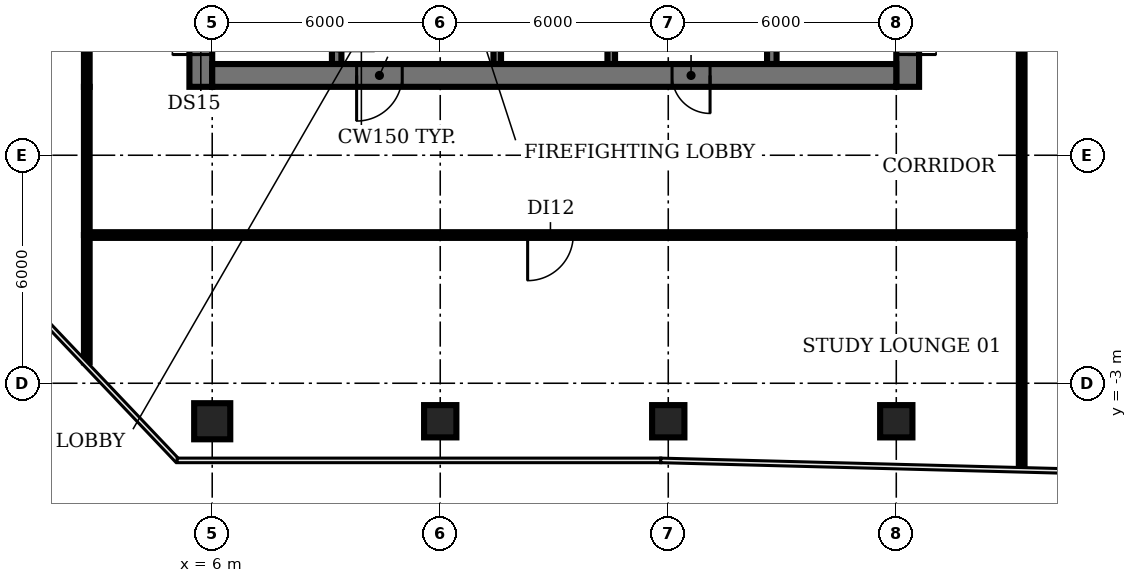
"""IFC4 building model, lengths in metres.
Left out: names, types, materials, properties, quantities, classifications, styles, units other than length and angle.
Written with IfcOpenShell. Run it as: python <this file> out.ifc"""

import sys

from ifc_helpers import new_model, si_unit, direction, frame, frame_2d, origin, origin_2d, place, context, subcontext, project, spatial, rectangle, circle, extrude, element, fill, save


model = new_model("IFC4")
c1 = context("Model", 3, precision=1e-05, world=origin(), true_north=direction((0.0, 1.0)))
c2 = subcontext(c1, "Body", "Model", "MODEL_VIEW")
j1 = project(units=[si_unit("LENGTHUNIT", "METRE"), si_unit("PLANEANGLEUNIT", "RADIAN")], contexts=[c1])
p1 = place(None, origin())
s1 = spatial("IfcSite", under=j1, at=p1, CompositionType="ELEMENT")
p2 = place(p1, origin())
s2 = spatial("IfcBuilding", under=s1, at=p2, CompositionType="ELEMENT")
p3 = place(p2, frame((0.0, 0.0, 163.4)))
s3 = spatial("IfcBuildingStorey", under=s2, at=p3, CompositionType="ELEMENT", Elevation=163.4)
p4 = place(p3, frame((6.0, -4.0, 0.0), z_axis=(0.0, 0.0, 1.0), x_axis=(1.0, 0.0, 0.0)))
e1 = element("IfcColumn", 1, at=p4, inside=s3, PredefinedType="COLUMN", context=c2, shape_type="SweptSolid", body=[
    extrude(circle(Radius=0.475, at=origin_2d()), origin(), (0.0, 0.0, 1.0), 3.85),
])
for number, where, z_axis, x_axis in (
    (2, (12.0, -4.0, 0.0), (0.0, 0.0, 1.0), (1.0, 0.0, 0.0)),
    (3, (18.0, -4.0, 0.0), (0.0, 0.0, 1.0), (1.0, 0.0, 0.0)),
    (4, (24.0, -4.0, 0.0), (0.0, 0.0, 1.0), (1.0, 0.0, 0.0)),
):
    element("IfcColumn", number, at=place(p3, frame(where, z_axis=z_axis, x_axis=x_axis)), inside=s3, PredefinedType="COLUMN", context=c2, shape_type="SweptSolid", body=[
        extrude(rectangle(XDim=0.85, YDim=0.85, at=origin_2d()), origin(), (0.0, 0.0, 1.0), 3.85),
    ])
p5 = place(p3, frame((9.275, 11.825, 0.0), z_axis=(0.0, 0.0, 1.0), x_axis=(0.0, -1.0, 0.0)))
e5 = element("IfcWall", 5, at=p5, inside=s3, PredefinedType="SHEAR", context=c2, shape_type="SweptSolid", body=[
    extrude(rectangle(XDim=6.425, YDim=0.25, at=frame_2d((3.212, 0.0))), origin(), (0.0, 0.0, 1.0), 3.85),
])
p6 = place(p5, frame((5.075, 0.0, 0.0)))
e6 = element("IfcOpeningElement", 6, at=p6, cuts=e5, PredefinedType="OPENING", context=c2, shape_type="SweptSolid", body=[
    extrude(rectangle(XDim=1.0, YDim=2.1, at=frame_2d((0.5, 1.05))), frame((0.0, 0.135, 0.0), z_axis=(0.0, -1.0, 0.0), x_axis=(1.0, 0.0, 0.0)), (0.0, 0.0, 1.0), 0.27),
])
p7 = place(p3, frame((13.5, 5.4, 0.0), z_axis=(0.0, 0.0, 1.0), x_axis=(0.0, 1.0, 0.0)))
e7 = element("IfcWall", 7, at=p7, inside=s3, PredefinedType="SHEAR", context=c2, shape_type="SweptSolid", body=[
    extrude(rectangle(XDim=8.2, YDim=0.2, at=frame_2d((4.1, 0.0))), origin(), (0.0, 0.0, 1.0), 3.85),
])
p8 = place(p7, frame((0.75, 0.0, 0.0)))
e8 = element("IfcOpeningElement", 8, at=p8, cuts=e7, PredefinedType="OPENING", context=c2, shape_type="SweptSolid", body=[
    extrude(rectangle(XDim=1.1, YDim=2.1, at=frame_2d((0.55, 1.05))), frame((0.0, 0.11, 0.0), z_axis=(0.0, -1.0, 0.0), x_axis=(1.0, 0.0, 0.0)), (0.0, 0.0, 1.0), 0.22),
])
p9 = place(p7, frame((3.55, 0.0, 0.0)))
e9 = element("IfcOpeningElement", 9, at=p9, cuts=e7, PredefinedType="OPENING", context=c2, shape_type="SweptSolid", body=[
    extrude(rectangle(XDim=1.1, YDim=2.1, at=frame_2d((0.55, 1.05))), frame((0.0, 0.11, 0.0), z_axis=(0.0, -1.0, 0.0), x_axis=(1.0, 0.0, 0.0)), (0.0, 0.0, 1.0), 0.22),
])
p10 = place(p7, frame((6.35, 0.0, 0.0)))
e10 = element("IfcOpeningElement", 10, at=p10, cuts=e7, PredefinedType="OPENING", context=c2, shape_type="SweptSolid", body=[
    extrude(rectangle(XDim=1.1, YDim=2.1, at=frame_2d((0.55, 1.05))), frame((0.0, 0.11, 0.0), z_axis=(0.0, -1.0, 0.0), x_axis=(1.0, 0.0, 0.0)), (0.0, 0.0, 1.0), 0.22),
])
p11 = place(p3, frame((16.5, 5.4, 0.0), z_axis=(0.0, 0.0, 1.0), x_axis=(0.0, 1.0, 0.0)))
e11 = element("IfcWall", 11, at=p11, inside=s3, PredefinedType="SHEAR", context=c2, shape_type="SweptSolid", body=[
    extrude(rectangle(XDim=8.2, YDim=0.2, at=frame_2d((4.1, 0.0))), origin(), (0.0, 0.0, 1.0), 3.85),
])
p12 = place(p3, frame((20.725, 5.4, 0.0), z_axis=(0.0, 0.0, 1.0), x_axis=(0.0, 1.0, 0.0)))
e12 = element("IfcWall", 12, at=p12, inside=s3, PredefinedType="SHEAR", context=c2, shape_type="SweptSolid", body=[
    extrude(rectangle(XDim=6.3, YDim=0.25, at=frame_2d((3.15, 0.0))), origin(), (0.0, 0.0, 1.0), 3.85),
])
p13 = place(p3, frame((5.7, 4.8, 0.0), z_axis=(0.0, 0.0, 1.0), x_axis=(0.0, 1.0, 0.0)))
e13 = element("IfcWall", 13, at=p13, inside=s3, PredefinedType="SHEAR", context=c2, shape_type="SweptSolid", body=[
    extrude(rectangle(XDim=20.6, YDim=0.6, at=frame_2d((10.3, 0.0))), origin(), (0.0, 0.0, 1.0), 3.85),
])
p14 = place(p13, frame((0.85, 0.0, 0.0)))
e14 = element("IfcOpeningElement", 14, at=p14, cuts=e13, PredefinedType="OPENING", context=c2, shape_type="SweptSolid", body=[
    extrude(rectangle(XDim=1.5, YDim=2.1, at=frame_2d((0.75, 1.05))), frame((0.0, 0.31, 0.0), z_axis=(0.0, -1.0, 0.0), x_axis=(1.0, 0.0, 0.0)), (0.0, 0.0, 1.0), 0.62),
])
p15 = place(p13, frame((7.3, 0.0, 0.0)))
e15 = element("IfcOpeningElement", 15, at=p15, cuts=e13, PredefinedType="OPENING", context=c2, shape_type="SweptSolid", body=[
    extrude(rectangle(XDim=1.2, YDim=2.1, at=frame_2d((0.6, 1.05))), frame((0.0, 0.31, 0.0), z_axis=(0.0, -1.0, 0.0), x_axis=(1.0, 0.0, 0.0)), (0.0, 0.0, 1.0), 0.62),
])
p16 = place(p13, frame((13.85, 0.0, 0.0)))
e16 = element("IfcOpeningElement", 16, at=p16, cuts=e13, PredefinedType="OPENING", context=c2, shape_type="SweptSolid", body=[
    extrude(rectangle(XDim=1.2, YDim=2.1, at=frame_2d((0.6, 1.05))), frame((0.0, 0.31, 0.0), z_axis=(0.0, -1.0, 0.0), x_axis=(1.0, 0.0, 0.0)), (0.0, 0.0, 1.0), 0.62),
])
p17 = place(p3, frame((24.3, 25.555, 0.0), z_axis=(0.0, 0.0, 1.0), x_axis=(0.0, -1.0, 0.0)))
e17 = element("IfcWall", 17, at=p17, inside=s3, PredefinedType="SHEAR", context=c2, shape_type="SweptSolid", body=[
    extrude(rectangle(XDim=20.755, YDim=0.6, at=frame_2d((10.377, 0.0))), origin(), (0.0, 0.0, 1.0), 3.85),
])
p18 = place(p17, frame((18.405, 0.0, 0.0)))
e18 = element("IfcOpeningElement", 18, at=p18, cuts=e17, PredefinedType="OPENING", context=c2, shape_type="SweptSolid", body=[
    extrude(rectangle(XDim=1.5, YDim=2.1, at=frame_2d((0.75, 1.05))), frame((0.0, 0.31, 0.0), z_axis=(0.0, -1.0, 0.0), x_axis=(1.0, 0.0, 0.0)), (0.0, 0.0, 1.0), 0.62),
])
p19 = place(p17, frame((12.305, 0.0, 0.0)))
e19 = element("IfcOpeningElement", 19, at=p19, cuts=e17, PredefinedType="OPENING", context=c2, shape_type="SweptSolid", body=[
    extrude(rectangle(XDim=0.9, YDim=2.1, at=frame_2d((0.45, 1.05))), frame((0.0, 0.31, 0.0), z_axis=(0.0, -1.0, 0.0), x_axis=(1.0, 0.0, 0.0)), (0.0, 0.0, 1.0), 0.62),
])
p20 = place(p17, frame((6.305, 0.0, 0.0)))
e20 = element("IfcOpeningElement", 20, at=p20, cuts=e17, PredefinedType="OPENING", context=c2, shape_type="SweptSolid", body=[
    extrude(rectangle(XDim=2.0, YDim=2.1, at=frame_2d((1.0, 1.05))), frame((0.0, 0.31, 0.0), z_axis=(0.0, -1.0, 0.0), x_axis=(1.0, 0.0, 0.0)), (0.0, 0.0, 1.0), 0.62),
])
p21 = place(p3, frame((24.0, 5.1, 0.0), z_axis=(0.0, 0.0, 1.0), x_axis=(-1.0, 0.0, 0.0)))
e21 = element("IfcWall", 21, at=p21, inside=s3, PredefinedType="SHEAR", context=c2, shape_type="SweptSolid", body=[
    extrude(rectangle(XDim=18.0, YDim=0.6, at=frame_2d((9.0, 0.0))), origin(), (0.0, 0.0, 1.0), 3.85),
])
p22 = place(p21, frame((13.0, 0.0, 0.0)))
e22 = element("IfcOpeningElement", 22, at=p22, cuts=e21, PredefinedType="OPENING", context=c2, shape_type="SweptSolid", body=[
    extrude(rectangle(XDim=1.2, YDim=2.1, at=frame_2d((0.6, 1.05))), frame((0.0, 0.31, 0.0), z_axis=(0.0, -1.0, 0.0), x_axis=(1.0, 0.0, 0.0)), (0.0, 0.0, 1.0), 0.62),
])
p23 = place(p21, frame((4.9, 0.0, 0.0)))
e23 = element("IfcOpeningElement", 23, at=p23, cuts=e21, PredefinedType="OPENING", context=c2, shape_type="SweptSolid", body=[
    extrude(rectangle(XDim=1.0, YDim=2.1, at=frame_2d((0.5, 1.05))), frame((0.0, 0.31, 0.0), z_axis=(0.0, -1.0, 0.0), x_axis=(1.0, 0.0, 0.0)), (0.0, 0.0, 1.0), 0.62),
])
p24 = place(p3, frame((2.7, -2.45, 0.0), z_axis=(0.0, 0.0, 1.0), x_axis=(0.0, 1.0, 0.0)))
e24 = element("IfcWall", 24, at=p24, inside=s3, PredefinedType="PARTITIONING", context=c2, shape_type="SweptSolid", body=[
    extrude(rectangle(XDim=3.35, YDim=0.15, at=frame_2d((1.675, 0.0))), origin(), (0.0, 0.0, 1.0), 2.88),
])
p25 = place(p3, frame((2.7, 0.9, 0.0), z_axis=(0.0, 0.0, 1.0), x_axis=(0.0, 1.0, 0.0)))
e25 = element("IfcWall", 25, at=p25, inside=s3, PredefinedType="PARTITIONING", context=c2, shape_type="SweptSolid", body=[
    extrude(rectangle(XDim=3.9, YDim=0.15, at=frame_2d((1.95, 0.0))), origin(), (0.0, 0.0, 1.0), 2.88),
])
p26 = place(p3, frame((2.7, 4.8, 0.0), z_axis=(0.0, 0.0, 1.0), x_axis=(0.0, 1.0, 0.0)))
e26 = element("IfcWall", 26, at=p26, inside=s3, PredefinedType="PARTITIONING", context=c2, shape_type="SweptSolid", body=[
    extrude(rectangle(XDim=20.6, YDim=0.15, at=frame_2d((10.3, 0.0))), origin(), (0.0, 0.0, 1.0), 2.88),
])
p27 = place(p26, frame((10.2, 0.0, 0.0)))
e27 = element("IfcOpeningElement", 27, at=p27, cuts=e26, PredefinedType="OPENING", context=c2, shape_type="SweptSolid", body=[
    extrude(rectangle(XDim=1.2, YDim=2.1, at=frame_2d((0.6, 1.05))), frame((0.0, 0.085, 0.0), z_axis=(0.0, -1.0, 0.0), x_axis=(1.0, 0.0, 0.0)), (0.0, 0.0, 1.0), 0.17),
])
p28 = place(p3, frame((27.3, -5.23, 0.0), z_axis=(0.0, 0.0, 1.0), x_axis=(0.0, 1.0, 0.0)))
e28 = element("IfcWall", 28, at=p28, inside=s3, PredefinedType="PARTITIONING", context=c2, shape_type="SweptSolid", body=[
    extrude(rectangle(XDim=6.13, YDim=0.15, at=frame_2d((3.065, 0.0))), origin(), (0.0, 0.0, 1.0), 2.88),
])
p29 = place(p3, frame((27.3, 0.9, 0.0), z_axis=(0.0, 0.0, 1.0), x_axis=(-1.0, 0.0, 0.0)))
e29 = element("IfcWall", 29, at=p29, inside=s3, PredefinedType="PARTITIONING", context=c2, shape_type="SweptSolid", body=[
    extrude(rectangle(XDim=24.6, YDim=0.15, at=frame_2d((12.3, 0.0))), origin(), (0.0, 0.0, 1.0), 2.88),
])
p30 = place(p29, frame((11.8, 0.0, 0.0)))
e30 = element("IfcOpeningElement", 30, at=p30, cuts=e29, PredefinedType="OPENING", context=c2, shape_type="SweptSolid", body=[
    extrude(rectangle(XDim=1.2, YDim=2.1, at=frame_2d((0.6, 1.05))), frame((0.0, 0.085, 0.0), z_axis=(0.0, -1.0, 0.0), x_axis=(1.0, 0.0, 0.0)), (0.0, 0.0, 1.0), 0.17),
])
p31 = place(p3, frame((27.3, 0.9, 0.0), z_axis=(0.0, 0.0, 1.0), x_axis=(0.0, 1.0, 0.0)))
e31 = element("IfcWall", 31, at=p31, inside=s3, PredefinedType="PARTITIONING", context=c2, shape_type="SweptSolid", body=[
    extrude(rectangle(XDim=13.9, YDim=0.15, at=frame_2d((6.95, 0.0))), origin(), (0.0, 0.0, 1.0), 2.88),
])
p32 = place(p14, origin())
e32 = element("IfcDoor", 32, at=p32, inside=s3, OperationType="DOUBLE_DOOR_SINGLE_SWING", PredefinedType="DOOR", context=c2, shape_type="SweptSolid", body=[
    extrude(rectangle(XDim=1.5, YDim=2.1, at=frame_2d((0.75, 1.05))), frame((0.0, 0.025, 0.0), z_axis=(0.0, -1.0, 0.0), x_axis=(1.0, 0.0, 0.0)), (0.0, 0.0, 1.0), 0.05),
])
fill(e14, e32)
p33 = place(p18, origin())
e33 = element("IfcDoor", 33, at=p33, inside=s3, OperationType="DOUBLE_DOOR_SINGLE_SWING", PredefinedType="DOOR", context=c2, shape_type="SweptSolid", body=[
    extrude(rectangle(XDim=1.5, YDim=2.1, at=frame_2d((0.75, 1.05))), frame((0.0, 0.025, 0.0), z_axis=(0.0, -1.0, 0.0), x_axis=(1.0, 0.0, 0.0)), (0.0, 0.0, 1.0), 0.05),
])
fill(e18, e33)
p34 = place(p22, origin())
e34 = element("IfcDoor", 34, at=p34, inside=s3, OperationType="SINGLE_SWING_RIGHT", PredefinedType="DOOR", context=c2, shape_type="SweptSolid", body=[
    extrude(rectangle(XDim=1.2, YDim=2.1, at=frame_2d((0.6, 1.05))), frame((0.0, 0.025, 0.0), z_axis=(0.0, -1.0, 0.0), x_axis=(1.0, 0.0, 0.0)), (0.0, 0.0, 1.0), 0.05),
])
fill(e22, e34)
p35 = place(p23, origin())
e35 = element("IfcDoor", 35, at=p35, inside=s3, OperationType="SINGLE_SWING_LEFT", PredefinedType="DOOR", context=c2, shape_type="SweptSolid", body=[
    extrude(rectangle(XDim=1.0, YDim=2.1, at=frame_2d((0.5, 1.05))), frame((0.0, -0.24, 0.0), z_axis=(0.0, -1.0, 0.0), x_axis=(1.0, 0.0, 0.0)), (0.0, 0.0, 1.0), 0.05),
])
fill(e23, e35)
p36 = place(p30, origin())
e36 = element("IfcDoor", 36, at=p36, inside=s3, OperationType="SINGLE_SWING_RIGHT", PredefinedType="DOOR", context=c2, shape_type="SweptSolid", body=[
    extrude(rectangle(XDim=1.2, YDim=2.1, at=frame_2d((0.6, 1.05))), frame((0.0, 0.025, 0.0), z_axis=(0.0, -1.0, 0.0), x_axis=(1.0, 0.0, 0.0)), (0.0, 0.0, 1.0), 0.05),
])
fill(e30, e36)
save(model, sys.argv[1])
